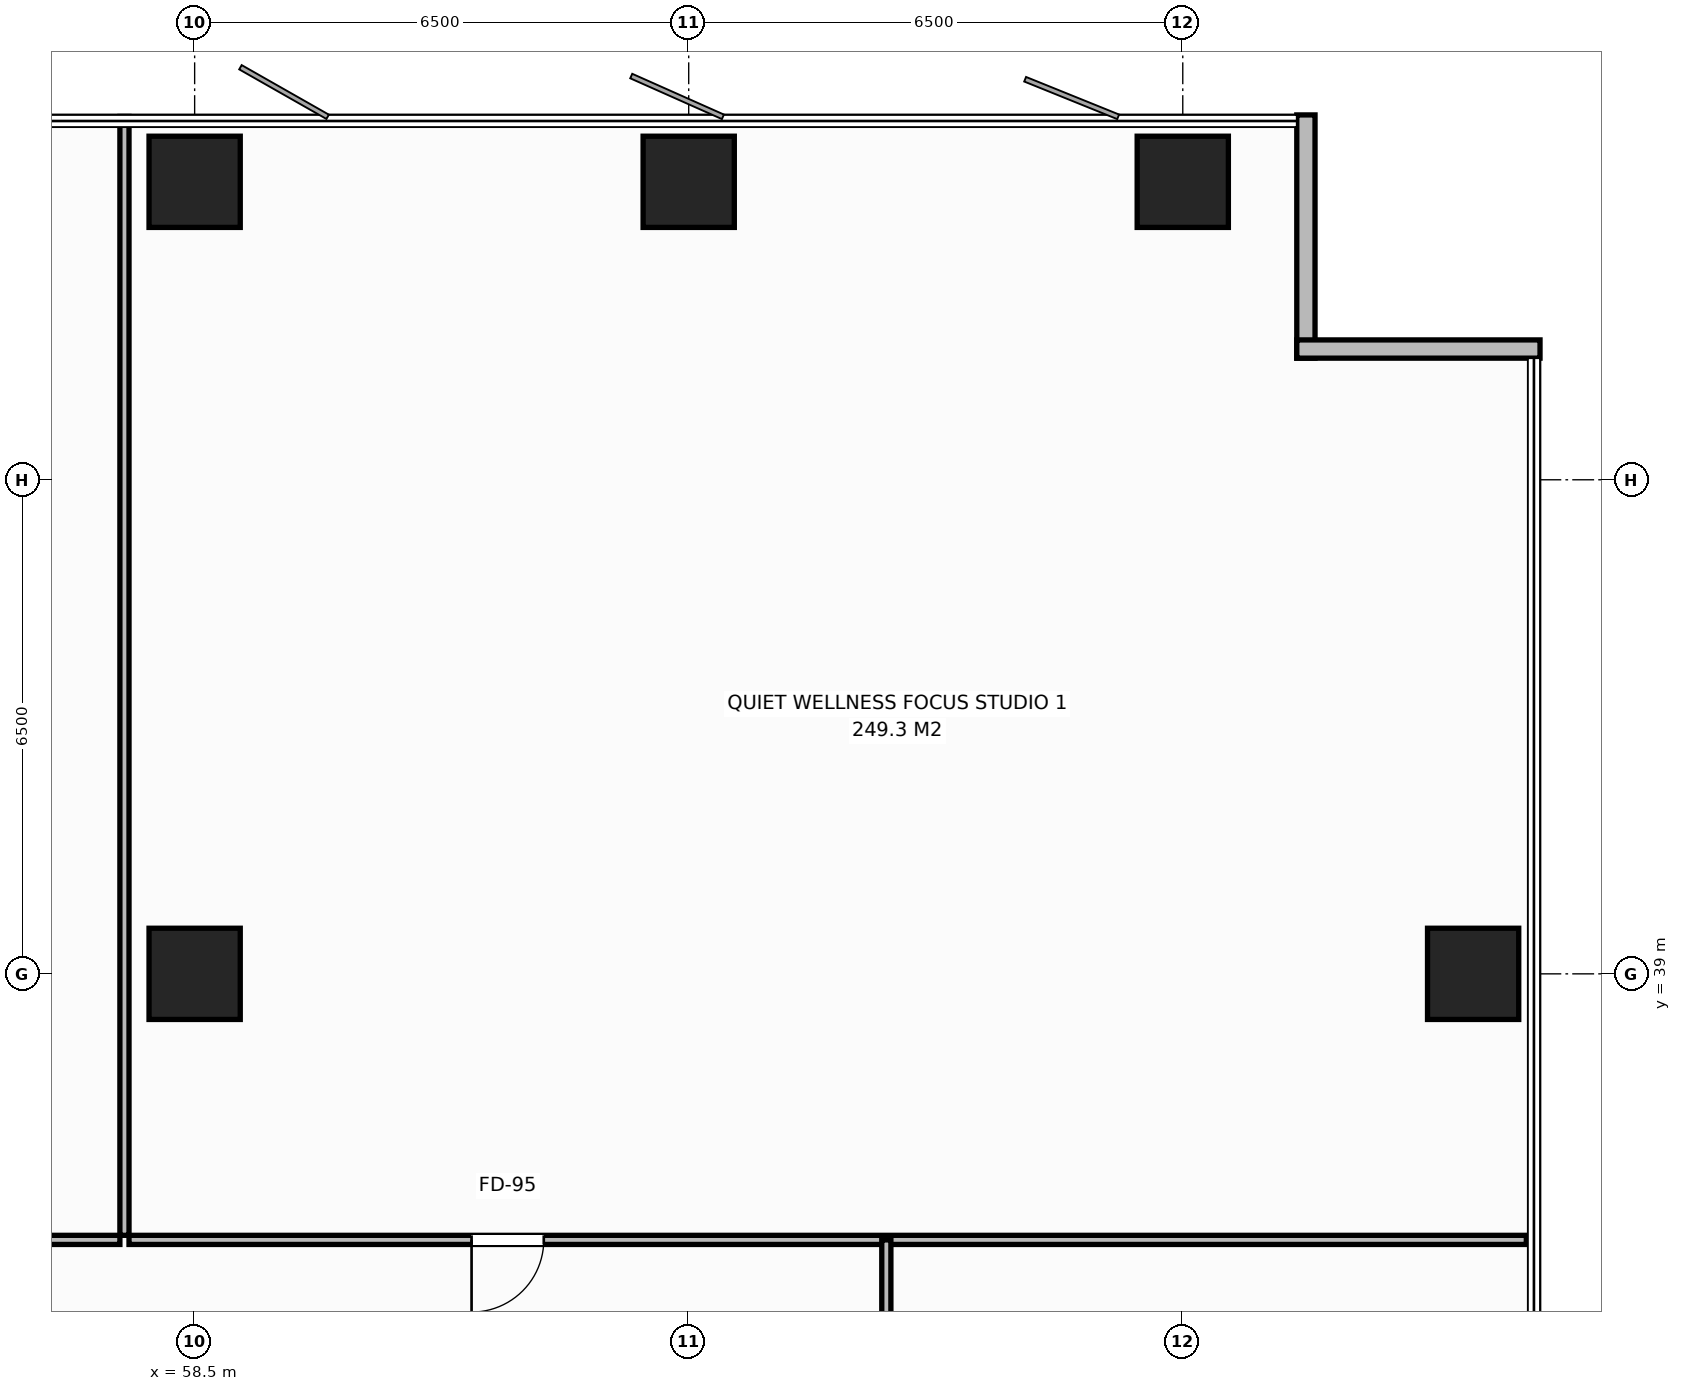
"""IFC4 building model, lengths in metres.
Left out: names, types, materials, properties, quantities, classifications, styles, units other than length and angle.
Written with IfcOpenShell. Run it as: python <this file> out.ifc"""

import sys

from ifc_helpers import new_model, si_unit, direction, frame, frame_2d, origin, origin_2d, place, context, subcontext, project, spatial, rectangle, extrude, element, fill, save


model = new_model("IFC4")
c1 = context("Model", 3, precision=1e-05, world=origin(), true_north=direction((0.0, 1.0)))
c2 = subcontext(c1, "Body", "Model", "MODEL_VIEW")
j1 = project(units=[si_unit("LENGTHUNIT", "METRE"), si_unit("PLANEANGLEUNIT", "RADIAN")], contexts=[c1])
p1 = place(None, origin())
s1 = spatial("IfcSite", under=j1, at=p1, CompositionType="ELEMENT")
p2 = place(p1, origin())
s2 = spatial("IfcBuilding", under=s1, at=p2, CompositionType="ELEMENT")
p3 = place(p2, frame((0.0, 0.0, 101.2)))
s3 = spatial("IfcBuildingStorey", under=s2, at=p3, CompositionType="ELEMENT", Elevation=101.2)
for number, where, z_axis, x_axis in (
    (1, (58.5, 39.0, 0.0), (0.0, 0.0, 1.0), (1.0, 0.0, 0.0)),
    (2, (58.5, 49.42, 0.0), (0.0, 0.0, 1.0), (1.0, 0.0, 0.0)),
    (3, (65.0, 49.42, 0.0), (0.0, 0.0, 1.0), (1.0, 0.0, 0.0)),
    (4, (71.5, 49.42, 0.0), (0.0, 0.0, 1.0), (1.0, 0.0, 0.0)),
    (5, (75.32, 39.0, 0.0), (0.0, 0.0, 1.0), (1.0, 0.0, 0.0)),
):
    element("IfcColumn", number, at=place(p3, frame(where, z_axis=z_axis, x_axis=x_axis)), inside=s3, PredefinedType="COLUMN", context=c2, shape_type="SweptSolid", body=[
        extrude(rectangle(XDim=1.2, YDim=1.2, at=origin_2d()), origin(), (0.0, 0.0, 1.0), 3.8),
    ])
for number, where, z_axis, x_axis in (
    (6, (73.12, 50.3, 0.0), (0.0, 0.0, 1.0), (0.0, -1.0, 0.0)),
    (7, (73.0, 47.22, 0.0), (0.0, 0.0, 1.0), (1.0, 0.0, 0.0)),
):
    element("IfcWall", number, at=place(p3, frame(where, z_axis=z_axis, x_axis=x_axis)), inside=s3, PredefinedType="STANDARD", context=c2, shape_type="SweptSolid", body=[
        extrude(rectangle(XDim=3.2, YDim=0.24, at=frame_2d((1.6, 0.0))), origin(), (0.0, 0.0, 1.0), 3.565),
    ])
p4 = place(p3, frame((57.577, 35.56, 0.0), z_axis=(0.0, 0.0, 1.0), x_axis=(0.0, 1.0, 0.0)))
e8 = element("IfcWall", 8, at=p4, inside=s3, PredefinedType="PARTITIONING", context=c2, shape_type="SweptSolid", body=[
    extrude(rectangle(XDim=14.72, YDim=0.12, at=frame_2d((7.36, 0.0))), origin(), (0.0, 0.0, 1.0), 3.565),
])
p5 = place(p3, frame((35.647, 35.5, 0.0), z_axis=(0.0, 0.0, 1.0), x_axis=(1.0, 0.0, 0.0)))
e9 = element("IfcWall", 9, at=p5, inside=s3, PredefinedType="PARTITIONING", context=c2, shape_type="SweptSolid", body=[
    extrude(rectangle(XDim=21.87, YDim=0.12, at=frame_2d((10.935, 0.0))), origin(), (0.0, 0.0, 1.0), 3.565),
])
p6 = place(p5, frame((0.48, 0.0, 0.0)))
e10 = element("IfcOpeningElement", 10, at=p6, cuts=e9, PredefinedType="OPENING", context=c2, shape_type="SweptSolid", body=[
    extrude(rectangle(XDim=0.95, YDim=2.15, at=frame_2d((0.475, 1.075))), frame((0.0, 0.07, 0.0), z_axis=(0.0, -1.0, 0.0), x_axis=(1.0, 0.0, 0.0)), (0.0, 0.0, 1.0), 0.14),
])
p7 = place(p3, frame((57.637, 35.5, 0.0), z_axis=(0.0, 0.0, 1.0), x_axis=(1.0, 0.0, 0.0)))
e11 = element("IfcWall", 11, at=p7, inside=s3, PredefinedType="PARTITIONING", context=c2, shape_type="SweptSolid", body=[
    extrude(rectangle(XDim=18.383, YDim=0.12, at=frame_2d((9.192, 0.0))), origin(), (0.0, 0.0, 1.0), 3.565),
])
p8 = place(p7, frame((4.507, 0.0, 0.0)))
e12 = element("IfcOpeningElement", 12, at=p8, cuts=e11, PredefinedType="OPENING", context=c2, shape_type="SweptSolid", body=[
    extrude(rectangle(XDim=0.95, YDim=2.15, at=frame_2d((0.475, 1.075))), frame((0.0, 0.07, 0.0), z_axis=(0.0, -1.0, 0.0), x_axis=(1.0, 0.0, 0.0)), (0.0, 0.0, 1.0), 0.14),
])
p9 = place(p3, frame((67.6, 26.0, 0.0), z_axis=(0.0, 0.0, 1.0), x_axis=(0.0, 1.0, 0.0)))
e13 = element("IfcWall", 13, at=p9, inside=s3, PredefinedType="PARTITIONING", context=c2, shape_type="SweptSolid", body=[
    extrude(rectangle(XDim=9.5, YDim=0.12, at=frame_2d((4.75, 0.0))), origin(), (0.0, 0.0, 1.0), 3.565),
])
p10 = place(p9, frame((3.225, 0.0, 0.0)))
e14 = element("IfcOpeningElement", 14, at=p10, cuts=e13, PredefinedType="OPENING", context=c2, shape_type="SweptSolid", body=[
    extrude(rectangle(XDim=0.95, YDim=2.15, at=frame_2d((0.475, 1.075))), frame((0.0, 0.07, 0.0), z_axis=(0.0, -1.0, 0.0), x_axis=(1.0, 0.0, 0.0)), (0.0, 0.0, 1.0), 0.14),
])
p11 = place(p8, origin())
e15 = element("IfcDoor", 15, at=p11, inside=s3, OperationType="SINGLE_SWING_RIGHT", PredefinedType="DOOR", context=c2, shape_type="SweptSolid", body=[
    extrude(rectangle(XDim=0.95, YDim=2.15, at=frame_2d((0.475, 1.075))), frame((0.0, 0.025, 0.0), z_axis=(0.0, -1.0, 0.0), x_axis=(1.0, 0.0, 0.0)), (0.0, 0.0, 1.0), 0.05),
])
fill(e12, e15)
save(model, sys.argv[1])
